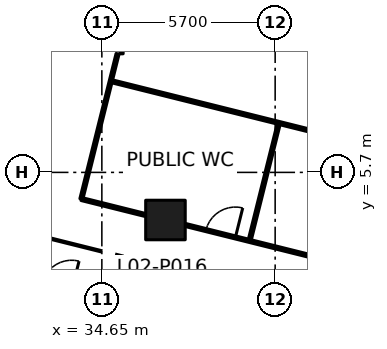
"""IFC4 building model, lengths in metres.
Left out: names, types, materials, properties, quantities, classifications, styles, units other than length and angle.
Written with IfcOpenShell. Run it as: python <this file> out.ifc"""

import sys

from ifc_helpers import new_model, si_unit, direction, frame, frame_2d, origin, origin_2d, place, context, subcontext, project, spatial, rectangle, extrude, element, fill, save


model = new_model("IFC4")
c1 = context("Model", 3, precision=1e-05, world=origin(), true_north=direction((0.0, 1.0)))
c2 = subcontext(c1, "Body", "Model", "MODEL_VIEW")
j1 = project(units=[si_unit("LENGTHUNIT", "METRE"), si_unit("PLANEANGLEUNIT", "RADIAN")], contexts=[c1])
p1 = place(None, origin())
s1 = spatial("IfcSite", under=j1, at=p1, CompositionType="ELEMENT")
p2 = place(p1, origin())
s2 = spatial("IfcBuilding", under=s1, at=p2, CompositionType="ELEMENT")
p3 = place(p2, frame((0.0, 0.0, 12.6)))
s3 = spatial("IfcBuildingStorey", under=s2, at=p3, CompositionType="ELEMENT", Elevation=12.6)
p4 = place(p3, frame((36.742, 4.134, 0.0), z_axis=(0.0, 0.0, 1.0), x_axis=(1.0, 0.0, 0.0)))
e1 = element("IfcColumn", 1, at=p4, inside=s3, PredefinedType="COLUMN", context=c2, shape_type="SweptSolid", body=[
    extrude(rectangle(XDim=1.3, YDim=1.3, at=origin_2d()), origin(), (0.0, 0.0, 1.0), 6.0),
])
p5 = place(p3, frame((33.976, 4.824, 0.0), z_axis=(0.0, 0.0, 1.0), x_axis=(0.241940400058, 0.970291112409, 0.0)))
e2 = element("IfcWall", 2, at=p5, inside=s3, PredefinedType="PARTITIONING", context=c2, shape_type="SweptSolid", body=[
    extrude(rectangle(XDim=4.922, YDim=0.1, at=frame_2d((2.461, 0.0))), origin(), (0.0, 0.0, 1.0), 5.55),
])
p6 = place(p3, frame((35.3, 9.6, 0.0), z_axis=(0.0, 0.0, 1.0), x_axis=(0.0, 1.0, 0.0)))
e3 = element("IfcWall", 3, at=p6, inside=s3, PredefinedType="PARTITIONING", context=c2, shape_type="SweptSolid", body=[
    extrude(rectangle(XDim=12.675, YDim=0.1, at=frame_2d((6.337, 0.0))), origin(), (0.0, 0.0, 1.0), 5.55),
])
p7 = place(p6, frame((8.28, 0.0, 0.0)))
e4 = element("IfcOpeningElement", 4, at=p7, cuts=e3, PredefinedType="OPENING", context=c2, shape_type="SweptSolid", body=[
    extrude(rectangle(XDim=1.0, YDim=2.1, at=frame_2d((0.5, 1.05))), frame((0.0, 0.06, 0.0), z_axis=(0.0, -1.0, 0.0), x_axis=(1.0, 0.0, 0.0)), (0.0, 0.0, 1.0), 0.12),
])
p8 = place(p3, frame((36.072, 4.301, 0.0), z_axis=(0.0, 0.0, 1.0), x_axis=(-0.970255412337, 0.242083528623, 0.0)))
e5 = element("IfcWall", 5, at=p8, inside=s3, PredefinedType="PARTITIONING", context=c2, shape_type="SweptSolid", body=[
    extrude(rectangle(XDim=2.16, YDim=0.1, at=frame_2d((1.08, 0.0))), origin(), (0.0, 0.0, 1.0), 5.55),
])
p9 = place(p3, frame((37.412, 3.967, 0.0), z_axis=(0.0, 0.0, 1.0), x_axis=(0.970335093604, -0.241763947107, 0.0)))
e6 = element("IfcWall", 6, at=p9, inside=s3, PredefinedType="PARTITIONING", context=c2, shape_type="SweptSolid", body=[
    extrude(rectangle(XDim=4.318, YDim=0.1, at=frame_2d((2.159, 0.0))), origin(), (0.0, 0.0, 1.0), 5.55),
])
p10 = place(p9, frame((0.68, 0.0, 0.0)))
e7 = element("IfcOpeningElement", 7, at=p10, cuts=e6, PredefinedType="OPENING", context=c2, shape_type="SweptSolid", body=[
    extrude(rectangle(XDim=1.0, YDim=2.1, at=frame_2d((0.5, 1.05))), frame((0.0, 0.06, 0.0), z_axis=(0.0, -1.0, 0.0), x_axis=(1.0, 0.0, 0.0)), (0.0, 0.0, 1.0), 0.12),
])
p11 = place(p3, frame((34.993, 8.693, 0.0), z_axis=(0.0, 0.0, 1.0), x_axis=(0.97029161727, -0.241938375328, 0.0)))
e8 = element("IfcWall", 8, at=p11, inside=s3, PredefinedType="PARTITIONING", context=c2, shape_type="SweptSolid", body=[
    extrude(rectangle(XDim=11.35, YDim=0.1, at=frame_2d((5.675, 0.0))), origin(), (0.0, 0.0, 1.0), 5.55),
])
p12 = place(p3, frame((39.519, 3.494, 0.0), z_axis=(0.0, 0.0, 1.0), x_axis=(0.242064152871, 0.970260246478, 0.0)))
e9 = element("IfcWall", 9, at=p12, inside=s3, PredefinedType="PARTITIONING", context=c2, shape_type="SweptSolid", body=[
    extrude(rectangle(XDim=3.899, YDim=0.1, at=frame_2d((1.95, 0.0))), origin(), (0.0, 0.0, 1.0), 5.55),
])
p13 = place(p10, origin())
e10 = element("IfcDoor", 10, at=p13, inside=s3, OperationType="SINGLE_SWING_RIGHT", PredefinedType="DOOR", context=c2, shape_type="SweptSolid", body=[
    extrude(rectangle(XDim=1.0, YDim=2.1, at=frame_2d((0.5, 1.05))), frame((0.0, 0.025, 0.0), z_axis=(0.0, -1.0, 0.0), x_axis=(1.0, 0.0, 0.0)), (0.0, 0.0, 1.0), 0.05),
])
fill(e7, e10)
save(model, sys.argv[1])
